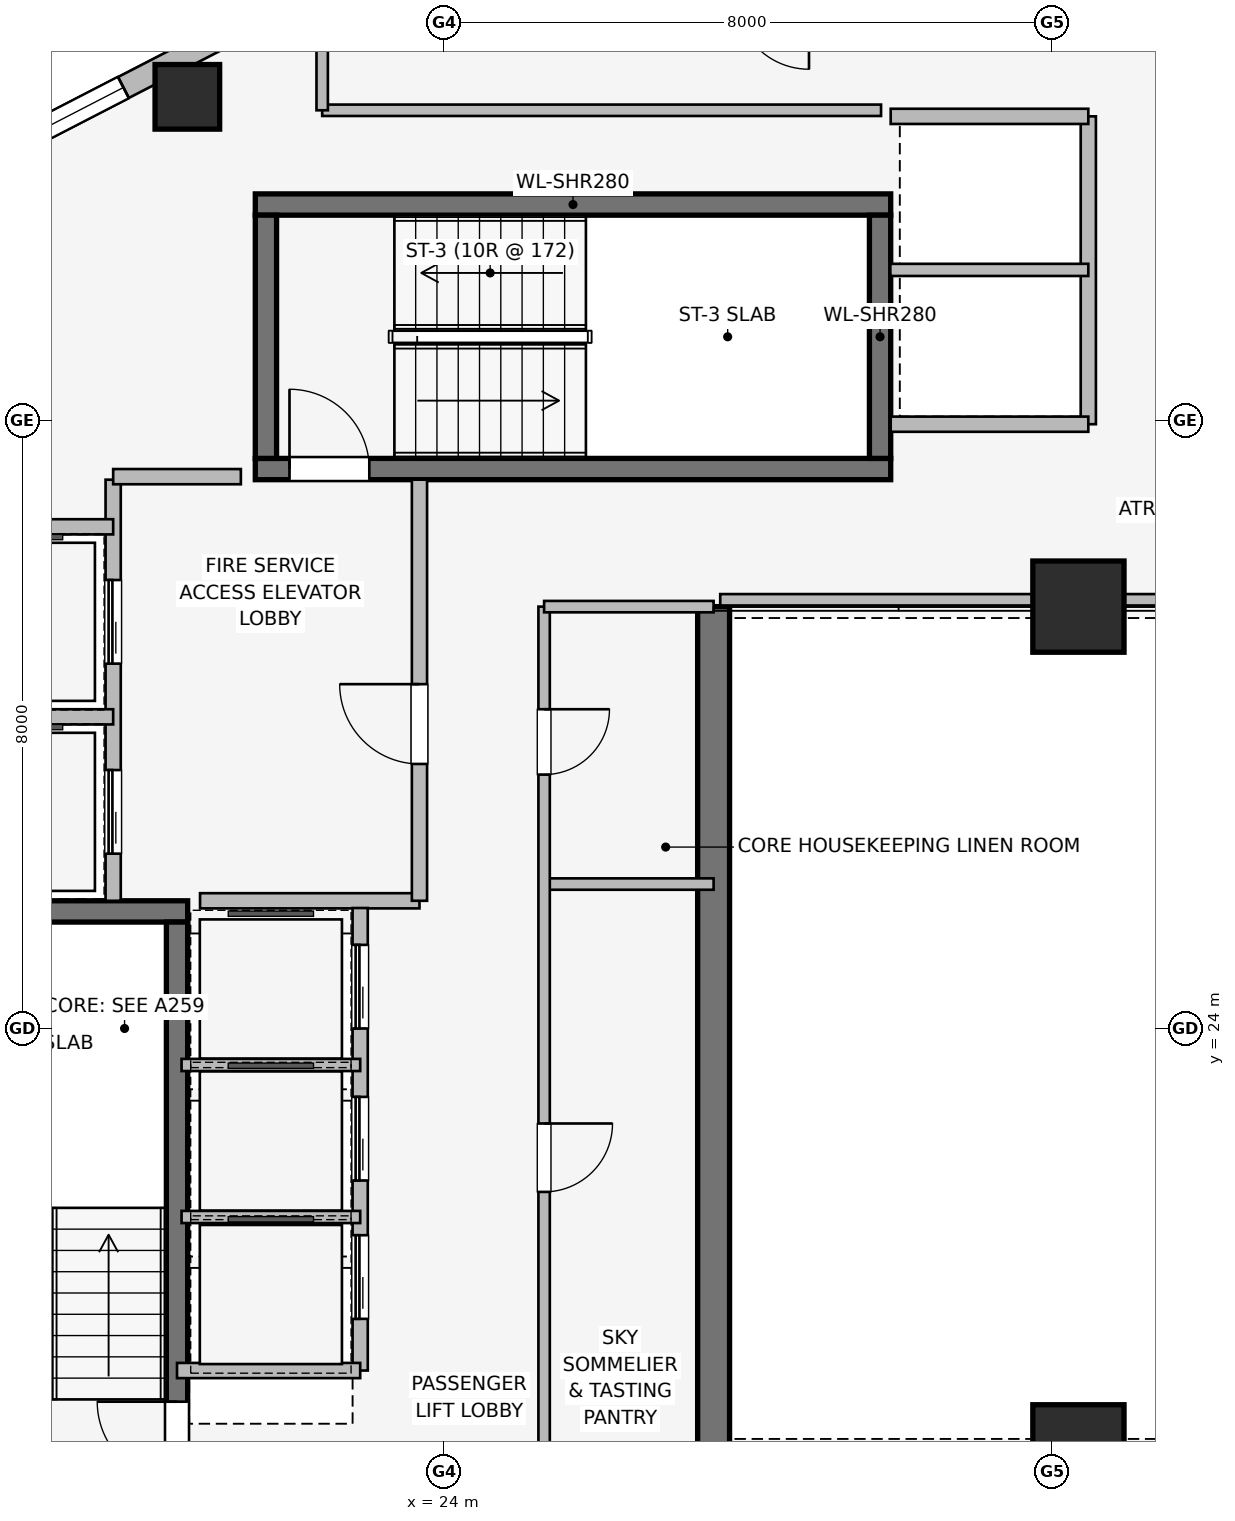
"""IFC4 building model, lengths in metres.
Left out: names, types, materials, properties, quantities, classifications, styles, units other than length and angle.
Written with IfcOpenShell. Run it as: python <this file> out.ifc"""

import sys

from ifc_helpers import new_model, si_unit, direction, frame, frame_2d, origin, origin_2d, place, context, subcontext, project, spatial, rectangle, extrude, element, fill, save


model = new_model("IFC4")
c1 = context("Model", 3, precision=1e-05, world=origin(), true_north=direction((0.0, 1.0)))
c2 = subcontext(c1, "Body", "Model", "MODEL_VIEW")
j1 = project(units=[si_unit("LENGTHUNIT", "METRE"), si_unit("PLANEANGLEUNIT", "RADIAN")], contexts=[c1])
p1 = place(None, origin())
s1 = spatial("IfcSite", under=j1, at=p1, CompositionType="ELEMENT")
p2 = place(p1, origin())
s2 = spatial("IfcBuilding", under=s1, at=p2, CompositionType="ELEMENT")
p3 = place(p2, frame((0.0, 0.0, 210.25)))
s3 = spatial("IfcBuildingStorey", under=s2, at=p3, CompositionType="ELEMENT", Elevation=210.25)
p4 = place(p3, frame((27.55, 29.55, 0.0), z_axis=(0.0, 0.0, 1.0), x_axis=(0.0, -1.0, 0.0)))
e1 = element("IfcWall", 1, at=p4, inside=s3, PredefinedType="SHEAR", context=c2, shape_type="SweptSolid", body=[
    extrude(rectangle(XDim=11.25, YDim=0.42, at=frame_2d((5.625, 0.0))), origin(), (0.0, 0.0, 1.0), 3.45),
])
p5 = place(p3, frame((20.63, 25.54, 0.0), z_axis=(0.0, 0.0, 1.0), x_axis=(-1.0, 0.0, 0.0)))
e2 = element("IfcWall", 2, at=p5, inside=s3, PredefinedType="SHEAR", context=c2, shape_type="SweptSolid", body=[
    extrude(rectangle(XDim=3.76, YDim=0.28, at=frame_2d((1.88, 0.0))), origin(), (0.0, 0.0, 1.0), 3.45),
])
p6 = place(p3, frame((20.49, 17.6, 0.0), z_axis=(0.0, 0.0, 1.0), x_axis=(0.0, 1.0, 0.0)))
e3 = element("IfcWall", 3, at=p6, inside=s3, PredefinedType="SHEAR", context=c2, shape_type="SweptSolid", body=[
    extrude(rectangle(XDim=7.8, YDim=0.28, at=frame_2d((3.9, 0.0))), origin(), (0.0, 0.0, 1.0), 3.45),
])
p7 = place(p6, frame((0.44, 0.0, 0.0)))
e4 = element("IfcOpeningElement", 4, at=p7, cuts=e3, PredefinedType="OPENING", context=c2, shape_type="SweptSolid", body=[
    extrude(rectangle(XDim=1.05, YDim=2.0, at=frame_2d((0.525, 1.0))), frame((0.0, 0.15, 0.0), z_axis=(0.0, -1.0, 0.0), x_axis=(1.0, 0.0, 0.0)), (0.0, 0.0, 1.0), 0.3),
])
p8 = place(p3, frame((21.52, 31.36, 0.0), z_axis=(0.0, 0.0, 1.0), x_axis=(1.0, 0.0, 0.0)))
e5 = element("IfcWall", 5, at=p8, inside=s3, PredefinedType="SHEAR", context=c2, shape_type="SweptSolid", body=[
    extrude(rectangle(XDim=8.36, YDim=0.28, at=frame_2d((4.18, 0.0))), origin(), (0.0, 0.0, 1.0), 3.45),
])
p9 = place(p8, frame((0.45, 0.0, 0.0)))
e6 = element("IfcOpeningElement", 6, at=p9, cuts=e5, PredefinedType="OPENING", context=c2, shape_type="SweptSolid", body=[
    extrude(rectangle(XDim=1.05, YDim=2.0, at=frame_2d((0.525, 1.0))), frame((0.0, 0.15, 0.0), z_axis=(0.0, -1.0, 0.0), x_axis=(1.0, 0.0, 0.0)), (0.0, 0.0, 1.0), 0.3),
])
p10 = place(p3, frame((29.88, 34.84, 0.0), z_axis=(0.0, 0.0, 1.0), x_axis=(-1.0, 0.0, 0.0)))
e7 = element("IfcWall", 7, at=p10, inside=s3, PredefinedType="SHEAR", context=c2, shape_type="SweptSolid", body=[
    extrude(rectangle(XDim=8.36, YDim=0.28, at=frame_2d((4.18, 0.0))), origin(), (0.0, 0.0, 1.0), 3.45),
])
for number, where, z_axis, x_axis in (
    (8, (21.66, 34.7, 0.0), (0.0, 0.0, 1.0), (0.0, -1.0, 0.0)),
    (9, (29.74, 31.5, 0.0), (0.0, 0.0, 1.0), (0.0, 1.0, 0.0)),
):
    element("IfcWall", number, at=place(p3, frame(where, z_axis=z_axis, x_axis=x_axis)), inside=s3, PredefinedType="SHEAR", context=c2, shape_type="SweptSolid", body=[
        extrude(rectangle(XDim=3.2, YDim=0.28, at=frame_2d((1.6, 0.0))), origin(), (0.0, 0.0, 1.0), 3.45),
    ])
for number, where, z_axis, x_axis in (
    (10, (32.35, 18.45, 0.0), (0.0, 0.0, 1.0), (1.0, 0.0, 0.0)),
    (11, (32.35, 29.55, 0.0), (0.0, 0.0, 1.0), (1.0, 0.0, 0.0)),
):
    element("IfcColumn", number, at=place(p3, frame(where, z_axis=z_axis, x_axis=x_axis)), inside=s3, PredefinedType="COLUMN", context=c2, shape_type="SweptSolid", body=[
        extrude(rectangle(XDim=1.2, YDim=1.2, at=origin_2d()), origin(), (0.0, 0.0, 1.0), 3.45),
    ])
p11 = place(p3, frame((20.626, 36.257, 0.0), z_axis=(0.0, 0.0, 1.0), x_axis=(1.0, 0.0, 0.0)))
e12 = element("IfcColumn", 12, at=p11, inside=s3, PredefinedType="COLUMN", context=c2, shape_type="SweptSolid", body=[
    extrude(rectangle(XDim=0.85, YDim=0.85, at=origin_2d()), origin(), (0.0, 0.0, 1.0), 3.45),
])
p12 = place(p3, frame((17.408, 35.153, 0.0), z_axis=(0.0, 0.0, 1.0), x_axis=(0.888626188278, 0.458632202867, 0.0)))
e13 = element("IfcWall", 13, at=p12, inside=s3, PredefinedType="STANDARD", context=c2, shape_type="SweptSolid", body=[
    extrude(rectangle(XDim=16.828, YDim=0.31, at=frame_2d((8.414, 0.0))), origin(), (0.0, 0.0, 1.0), 3.19),
])
p13 = place(p12, frame((0.675, 0.0, 0.75)))
e14 = element("IfcOpeningElement", 14, at=p13, cuts=e13, PredefinedType="OPENING", context=c2, shape_type="SweptSolid", body=[
    extrude(rectangle(XDim=2.0, YDim=1.5, at=frame_2d((1.0, 0.75))), frame((0.0, 0.165, 0.0), z_axis=(0.0, -1.0, 0.0), x_axis=(1.0, 0.0, 0.0)), (0.0, 0.0, 1.0), 0.33),
])
p14 = place(p12, frame((6.312, 0.0, 0.75)))
e15 = element("IfcOpeningElement", 15, at=p14, cuts=e13, PredefinedType="OPENING", context=c2, shape_type="SweptSolid", body=[
    extrude(rectangle(XDim=1.35, YDim=1.45, at=frame_2d((0.675, 0.725))), frame((0.0, 0.165, 0.0), z_axis=(0.0, -1.0, 0.0), x_axis=(1.0, 0.0, 0.0)), (0.0, 0.0, 1.0), 0.33),
])
p15 = place(p12, frame((8.676, 0.0, 0.75)))
e16 = element("IfcOpeningElement", 16, at=p15, cuts=e13, PredefinedType="OPENING", context=c2, shape_type="SweptSolid", body=[
    extrude(rectangle(XDim=1.35, YDim=1.45, at=frame_2d((0.675, 0.725))), frame((0.0, 0.165, 0.0), z_axis=(0.0, -1.0, 0.0), x_axis=(1.0, 0.0, 0.0)), (0.0, 0.0, 1.0), 0.33),
])
p16 = place(p12, frame((11.041, 0.0, 0.75)))
e17 = element("IfcOpeningElement", 17, at=p16, cuts=e13, PredefinedType="OPENING", context=c2, shape_type="SweptSolid", body=[
    extrude(rectangle(XDim=1.35, YDim=1.45, at=frame_2d((0.675, 0.725))), frame((0.0, 0.165, 0.0), z_axis=(0.0, -1.0, 0.0), x_axis=(1.0, 0.0, 0.0)), (0.0, 0.0, 1.0), 0.33),
])
p17 = place(p12, frame((14.153, 0.0, 0.75)))
e18 = element("IfcOpeningElement", 18, at=p17, cuts=e13, PredefinedType="OPENING", context=c2, shape_type="SweptSolid", body=[
    extrude(rectangle(XDim=2.0, YDim=1.5, at=frame_2d((1.0, 0.75))), frame((0.0, 0.165, 0.0), z_axis=(0.0, -1.0, 0.0), x_axis=(1.0, 0.0, 0.0)), (0.0, 0.0, 1.0), 0.33),
])
p18 = place(p3, frame((19.65, 25.68, 0.0), z_axis=(0.0, 0.0, 1.0), x_axis=(0.0, 1.0, 0.0)))
e19 = element("IfcWall", 19, at=p18, inside=s3, PredefinedType="PARTITIONING", context=c2, shape_type="SweptSolid", body=[
    extrude(rectangle(XDim=5.54, YDim=0.2, at=frame_2d((2.77, 0.0))), origin(), (0.0, 0.0, 1.0), 3.19),
])
p19 = place(p18, frame((0.62, 0.0, 0.0)))
e20 = element("IfcOpeningElement", 20, at=p19, cuts=e19, PredefinedType="OPENING", context=c2, shape_type="SweptSolid", body=[
    extrude(rectangle(XDim=1.1, YDim=2.2, at=frame_2d((0.55, 1.1))), frame((0.0, 0.11, 0.0), z_axis=(0.0, -1.0, 0.0), x_axis=(1.0, 0.0, 0.0)), (0.0, 0.0, 1.0), 0.22),
])
p20 = place(p18, frame((3.12, 0.0, 0.0)))
e21 = element("IfcOpeningElement", 21, at=p20, cuts=e19, PredefinedType="OPENING", context=c2, shape_type="SweptSolid", body=[
    extrude(rectangle(XDim=1.1, YDim=2.2, at=frame_2d((0.55, 1.1))), frame((0.0, 0.11, 0.0), z_axis=(0.0, -1.0, 0.0), x_axis=(1.0, 0.0, 0.0)), (0.0, 0.0, 1.0), 0.22),
])
p21 = place(p3, frame((20.793, 25.68, 0.0), z_axis=(0.0, 0.0, 1.0), x_axis=(1.0, 0.0, 0.0)))
e22 = element("IfcWall", 22, at=p21, inside=s3, PredefinedType="PARTITIONING", context=c2, shape_type="SweptSolid", body=[
    extrude(rectangle(XDim=2.887, YDim=0.2, at=frame_2d((1.443, 0.0))), origin(), (0.0, 0.0, 1.0), 3.19),
])
p22 = place(p3, frame((23.68, 25.68, 0.0), z_axis=(0.0, 0.0, 1.0), x_axis=(0.0, 1.0, 0.0)))
e23 = element("IfcWall", 23, at=p22, inside=s3, PredefinedType="PARTITIONING", context=c2, shape_type="SweptSolid", body=[
    extrude(rectangle(XDim=5.54, YDim=0.2, at=frame_2d((2.77, 0.0))), origin(), (0.0, 0.0, 1.0), 3.19),
])
p23 = place(p22, frame((1.8, 0.0, 0.0)))
e24 = element("IfcOpeningElement", 24, at=p23, cuts=e23, PredefinedType="OPENING", context=c2, shape_type="SweptSolid", body=[
    extrude(rectangle(XDim=1.05, YDim=2.0, at=frame_2d((0.525, 1.0))), frame((0.0, 0.11, 0.0), z_axis=(0.0, -1.0, 0.0), x_axis=(1.0, 0.0, 0.0)), (0.0, 0.0, 1.0), 0.22),
])
p24 = place(p3, frame((21.33, 31.26, 0.0), z_axis=(0.0, 0.0, 1.0), x_axis=(-1.0, 0.0, 0.0)))
e25 = element("IfcWall", 25, at=p24, inside=s3, PredefinedType="PARTITIONING", context=c2, shape_type="SweptSolid", body=[
    extrude(rectangle(XDim=1.68, YDim=0.2, at=frame_2d((0.84, 0.0))), origin(), (0.0, 0.0, 1.0), 3.19),
])
p25 = place(p3, frame((17.15, 28.1, 0.0), z_axis=(0.0, 0.0, 1.0), x_axis=(1.0, 0.0, 0.0)))
e26 = element("IfcWall", 26, at=p25, inside=s3, PredefinedType="PARTITIONING", context=c2, shape_type="SweptSolid", body=[
    extrude(rectangle(XDim=2.5, YDim=0.2, at=frame_2d((1.25, 0.0))), origin(), (0.0, 0.0, 1.0), 3.19),
])
p26 = place(p3, frame((19.65, 30.6, 0.0), z_axis=(0.0, 0.0, 1.0), x_axis=(-1.0, 0.0, 0.0)))
e27 = element("IfcWall", 27, at=p26, inside=s3, PredefinedType="PARTITIONING", context=c2, shape_type="SweptSolid", body=[
    extrude(rectangle(XDim=2.5, YDim=0.2, at=frame_2d((1.25, 0.0))), origin(), (0.0, 0.0, 1.0), 2.09),
])
p27 = place(p3, frame((32.48, 31.95, 0.0), z_axis=(0.0, 0.0, 1.0), x_axis=(0.0, 1.0, 0.0)))
e28 = element("IfcWall", 28, at=p27, inside=s3, PredefinedType="PARTITIONING", context=c2, shape_type="SweptSolid", body=[
    extrude(rectangle(XDim=4.05, YDim=0.2, at=frame_2d((2.025, 0.0))), origin(), (0.0, 0.0, 1.0), 3.19),
])
for number, where, z_axis, x_axis in (
    (29, (29.88, 36.0, 0.0), (0.0, 0.0, 1.0), (1.0, 0.0, 0.0)),
    (30, (32.48, 31.95, 0.0), (0.0, 0.0, 1.0), (-1.0, 0.0, 0.0)),
):
    element("IfcWall", number, at=place(p3, frame(where, z_axis=z_axis, x_axis=x_axis)), inside=s3, PredefinedType="PARTITIONING", context=c2, shape_type="SweptSolid", body=[
        extrude(rectangle(XDim=2.6, YDim=0.2, at=frame_2d((1.3, 0.0))), origin(), (0.0, 0.0, 1.0), 3.19),
    ])
p28 = place(p3, frame((29.875, 33.98, 0.0), z_axis=(0.0, 0.0, 1.0), x_axis=(1.0, 0.0, 0.0)))
e31 = element("IfcWall", 31, at=p28, inside=s3, PredefinedType="PARTITIONING", context=c2, shape_type="SweptSolid", body=[
    extrude(rectangle(XDim=2.605, YDim=0.16, at=frame_2d((1.302, 0.0))), origin(), (0.0, 0.0, 1.0), 2.582),
])
p29 = place(p3, frame((22.9, 19.5, 0.0), z_axis=(0.0, 0.0, 1.0), x_axis=(0.0, 1.0, 0.0)))
e32 = element("IfcWall", 32, at=p29, inside=s3, PredefinedType="PARTITIONING", context=c2, shape_type="SweptSolid", body=[
    extrude(rectangle(XDim=6.085, YDim=0.2, at=frame_2d((3.042, 0.0))), origin(), (0.0, 0.0, 1.0), 3.19),
])
p30 = place(p29, frame((0.68, 0.0, 0.0)))
e33 = element("IfcOpeningElement", 33, at=p30, cuts=e32, PredefinedType="OPENING", context=c2, shape_type="SweptSolid", body=[
    extrude(rectangle(XDim=1.1, YDim=2.2, at=frame_2d((0.55, 1.1))), frame((0.0, 0.11, 0.0), z_axis=(0.0, -1.0, 0.0), x_axis=(1.0, 0.0, 0.0)), (0.0, 0.0, 1.0), 0.22),
])
p31 = place(p29, frame((2.5, 0.0, 0.0)))
e34 = element("IfcOpeningElement", 34, at=p31, cuts=e32, PredefinedType="OPENING", context=c2, shape_type="SweptSolid", body=[
    extrude(rectangle(XDim=1.1, YDim=2.2, at=frame_2d((0.55, 1.1))), frame((0.0, 0.11, 0.0), z_axis=(0.0, -1.0, 0.0), x_axis=(1.0, 0.0, 0.0)), (0.0, 0.0, 1.0), 0.22),
])
p32 = place(p29, frame((4.5, 0.0, 0.0)))
e35 = element("IfcOpeningElement", 35, at=p32, cuts=e32, PredefinedType="OPENING", context=c2, shape_type="SweptSolid", body=[
    extrude(rectangle(XDim=1.1, YDim=2.2, at=frame_2d((0.55, 1.1))), frame((0.0, 0.11, 0.0), z_axis=(0.0, -1.0, 0.0), x_axis=(1.0, 0.0, 0.0)), (0.0, 0.0, 1.0), 0.22),
])
p33 = place(p3, frame((20.49, 19.5, 0.0), z_axis=(0.0, 0.0, 1.0), x_axis=(1.0, 0.0, 0.0)))
e36 = element("IfcWall", 36, at=p33, inside=s3, PredefinedType="PARTITIONING", context=c2, shape_type="SweptSolid", body=[
    extrude(rectangle(XDim=2.41, YDim=0.2, at=frame_2d((1.205, 0.0))), origin(), (0.0, 0.0, 1.0), 2.09),
])
for number, where, z_axis, x_axis in (
    (37, (20.55, 21.52, 0.0), (0.0, 0.0, 1.0), (1.0, 0.0, 0.0)),
    (38, (20.55, 23.52, 0.0), (0.0, 0.0, 1.0), (1.0, 0.0, 0.0)),
):
    element("IfcWall", number, at=place(p3, frame(where, z_axis=z_axis, x_axis=x_axis)), inside=s3, PredefinedType="PARTITIONING", context=c2, shape_type="SweptSolid", body=[
        extrude(rectangle(XDim=2.35, YDim=0.16, at=frame_2d((1.175, 0.0))), origin(), (0.0, 0.0, 1.0), 3.19),
    ])
p34 = place(p3, frame((25.32, 25.9, 0.0), z_axis=(0.0, 0.0, 1.0), x_axis=(1.0, 0.0, 0.0)))
e39 = element("IfcWall", 39, at=p34, inside=s3, PredefinedType="PARTITIONING", context=c2, shape_type="SweptSolid", body=[
    extrude(rectangle(XDim=2.23, YDim=0.15, at=frame_2d((1.115, 0.0))), origin(), (0.0, 0.0, 1.0), 3.19),
])
p35 = place(p3, frame((25.32, 29.55, 0.0), z_axis=(0.0, 0.0, 1.0), x_axis=(0.0, -1.0, 0.0)))
e40 = element("IfcWall", 40, at=p35, inside=s3, PredefinedType="PARTITIONING", context=c2, shape_type="SweptSolid", body=[
    extrude(rectangle(XDim=11.19, YDim=0.15, at=frame_2d((5.595, 0.0))), origin(), (0.0, 0.0, 1.0), 3.19),
])
p36 = place(p35, frame((1.35, 0.0, 0.0)))
e41 = element("IfcOpeningElement", 41, at=p36, cuts=e40, PredefinedType="OPENING", context=c2, shape_type="SweptSolid", body=[
    extrude(rectangle(XDim=0.86, YDim=2.0, at=frame_2d((0.43, 1.0))), frame((0.0, 0.085, 0.0), z_axis=(0.0, -1.0, 0.0), x_axis=(1.0, 0.0, 0.0)), (0.0, 0.0, 1.0), 0.17),
])
p37 = place(p35, frame((6.8, 0.0, 0.0)))
e42 = element("IfcOpeningElement", 42, at=p37, cuts=e40, PredefinedType="OPENING", context=c2, shape_type="SweptSolid", body=[
    extrude(rectangle(XDim=0.9, YDim=2.0, at=frame_2d((0.45, 1.0))), frame((0.0, 0.085, 0.0), z_axis=(0.0, -1.0, 0.0), x_axis=(1.0, 0.0, 0.0)), (0.0, 0.0, 1.0), 0.17),
])
p38 = place(p3, frame((27.55, 29.55, 0.0), z_axis=(0.0, 0.0, 1.0), x_axis=(-1.0, 0.0, 0.0)))
e43 = element("IfcWall", 43, at=p38, inside=s3, PredefinedType="PARTITIONING", context=c2, shape_type="SweptSolid", body=[
    extrude(rectangle(XDim=2.23, YDim=0.15, at=frame_2d((1.115, 0.0))), origin(), (0.0, 0.0, 1.0), 2.09),
])
p39 = place(p3, frame((39.84, 29.64, 0.0), z_axis=(0.0, 0.0, 1.0), x_axis=(-1.0, 0.0, 0.0)))
e44 = element("IfcWall", 44, at=p39, inside=s3, PredefinedType="PARTITIONING", context=c2, shape_type="SweptSolid", body=[
    extrude(rectangle(XDim=12.203, YDim=0.15, at=frame_2d((6.102, 0.0))), origin(), (0.0, 0.0, 1.0), 2.331),
])
p40 = place(p3, frame((29.753, 36.08, 0.0), z_axis=(0.0, 0.0, 1.0), x_axis=(-1.0, 0.0, 0.0)))
e45 = element("IfcWall", 45, at=p40, inside=s3, PredefinedType="PARTITIONING", context=c2, shape_type="SweptSolid", body=[
    extrude(rectangle(XDim=7.353, YDim=0.15, at=frame_2d((3.677, 0.0))), origin(), (0.0, 0.0, 1.0), 3.19),
])
p41 = place(p3, frame((22.4, 36.08, 0.0), z_axis=(0.0, 0.0, 1.0), x_axis=(0.0, 1.0, 0.0)))
e46 = element("IfcWall", 46, at=p41, inside=s3, PredefinedType="PARTITIONING", context=c2, shape_type="SweptSolid", body=[
    extrude(rectangle(XDim=1.43, YDim=0.15, at=frame_2d((0.715, 0.0))), origin(), (0.0, 0.0, 1.0), 3.19),
])
p42 = place(p13, origin())
e47 = element("IfcWindow", 47, at=p42, inside=s3, PartitioningType="SINGLE_PANEL", PredefinedType="WINDOW", context=c2, shape_type="SweptSolid", body=[
    extrude(rectangle(XDim=2.0, YDim=1.5, at=frame_2d((1.0, 0.75))), frame((0.0, 0.03, 0.0), z_axis=(0.0, -1.0, 0.0), x_axis=(1.0, 0.0, 0.0)), (0.0, 0.0, 1.0), 0.06),
])
fill(e14, e47)
p43 = place(p7, origin())
e48 = element("IfcDoor", 48, at=p43, inside=s3, OperationType="SINGLE_SWING_RIGHT", PredefinedType="DOOR", context=c2, shape_type="SweptSolid", body=[
    extrude(rectangle(XDim=1.05, YDim=2.0, at=frame_2d((0.525, 1.0))), frame((0.0, 0.025, 0.0), z_axis=(0.0, -1.0, 0.0), x_axis=(1.0, 0.0, 0.0)), (0.0, 0.0, 1.0), 0.05),
])
fill(e4, e48)
p44 = place(p9, origin())
e49 = element("IfcDoor", 49, at=p44, inside=s3, OperationType="SINGLE_SWING_LEFT", PredefinedType="DOOR", context=c2, shape_type="SweptSolid", body=[
    extrude(rectangle(XDim=1.05, YDim=2.0, at=frame_2d((0.525, 1.0))), frame((0.0, 0.025, 0.0), z_axis=(0.0, -1.0, 0.0), x_axis=(1.0, 0.0, 0.0)), (0.0, 0.0, 1.0), 0.05),
])
fill(e6, e49)
p45 = place(p19, origin())
e50 = element("IfcDoor", 50, at=p45, inside=s3, OperationType="SLIDING_TO_LEFT", PredefinedType="DOOR", context=c2, shape_type="SweptSolid", body=[
    extrude(rectangle(XDim=1.1, YDim=2.2, at=frame_2d((0.55, 1.1))), frame((0.0, 0.025, 0.0), z_axis=(0.0, -1.0, 0.0), x_axis=(1.0, 0.0, 0.0)), (0.0, 0.0, 1.0), 0.05),
])
fill(e20, e50)
p46 = place(p20, origin())
e51 = element("IfcDoor", 51, at=p46, inside=s3, OperationType="SLIDING_TO_LEFT", PredefinedType="DOOR", context=c2, shape_type="SweptSolid", body=[
    extrude(rectangle(XDim=1.1, YDim=2.2, at=frame_2d((0.55, 1.1))), frame((0.0, 0.025, 0.0), z_axis=(0.0, -1.0, 0.0), x_axis=(1.0, 0.0, 0.0)), (0.0, 0.0, 1.0), 0.05),
])
fill(e21, e51)
p47 = place(p23, origin())
e52 = element("IfcDoor", 52, at=p47, inside=s3, OperationType="SINGLE_SWING_RIGHT", PredefinedType="DOOR", context=c2, shape_type="SweptSolid", body=[
    extrude(rectangle(XDim=1.05, YDim=2.0, at=frame_2d((0.525, 1.0))), frame((0.0, 0.025, 0.0), z_axis=(0.0, -1.0, 0.0), x_axis=(1.0, 0.0, 0.0)), (0.0, 0.0, 1.0), 0.05),
])
fill(e24, e52)
p48 = place(p30, origin())
e53 = element("IfcDoor", 53, at=p48, inside=s3, OperationType="SLIDING_TO_LEFT", PredefinedType="DOOR", context=c2, shape_type="SweptSolid", body=[
    extrude(rectangle(XDim=1.1, YDim=2.2, at=frame_2d((0.55, 1.1))), frame((0.0, 0.025, 0.0), z_axis=(0.0, -1.0, 0.0), x_axis=(1.0, 0.0, 0.0)), (0.0, 0.0, 1.0), 0.05),
])
fill(e33, e53)
p49 = place(p31, origin())
e54 = element("IfcDoor", 54, at=p49, inside=s3, OperationType="SLIDING_TO_LEFT", PredefinedType="DOOR", context=c2, shape_type="SweptSolid", body=[
    extrude(rectangle(XDim=1.1, YDim=2.2, at=frame_2d((0.55, 1.1))), frame((0.0, 0.025, 0.0), z_axis=(0.0, -1.0, 0.0), x_axis=(1.0, 0.0, 0.0)), (0.0, 0.0, 1.0), 0.05),
])
fill(e34, e54)
p50 = place(p32, origin())
e55 = element("IfcDoor", 55, at=p50, inside=s3, OperationType="SLIDING_TO_LEFT", PredefinedType="DOOR", context=c2, shape_type="SweptSolid", body=[
    extrude(rectangle(XDim=1.1, YDim=2.2, at=frame_2d((0.55, 1.1))), frame((0.0, 0.025, 0.0), z_axis=(0.0, -1.0, 0.0), x_axis=(1.0, 0.0, 0.0)), (0.0, 0.0, 1.0), 0.05),
])
fill(e35, e55)
p51 = place(p36, origin())
e56 = element("IfcDoor", 56, at=p51, inside=s3, OperationType="SINGLE_SWING_LEFT", PredefinedType="DOOR", context=c2, shape_type="SweptSolid", body=[
    extrude(rectangle(XDim=0.86, YDim=2.0, at=frame_2d((0.43, 1.0))), frame((0.0, 0.025, 0.0), z_axis=(0.0, -1.0, 0.0), x_axis=(1.0, 0.0, 0.0)), (0.0, 0.0, 1.0), 0.05),
])
fill(e41, e56)
p52 = place(p37, origin())
e57 = element("IfcDoor", 57, at=p52, inside=s3, OperationType="SINGLE_SWING_LEFT", PredefinedType="DOOR", context=c2, shape_type="SweptSolid", body=[
    extrude(rectangle(XDim=0.9, YDim=2.0, at=frame_2d((0.45, 1.0))), frame((0.0, 0.025, 0.0), z_axis=(0.0, -1.0, 0.0), x_axis=(1.0, 0.0, 0.0)), (0.0, 0.0, 1.0), 0.05),
])
fill(e42, e57)
save(model, sys.argv[1])
